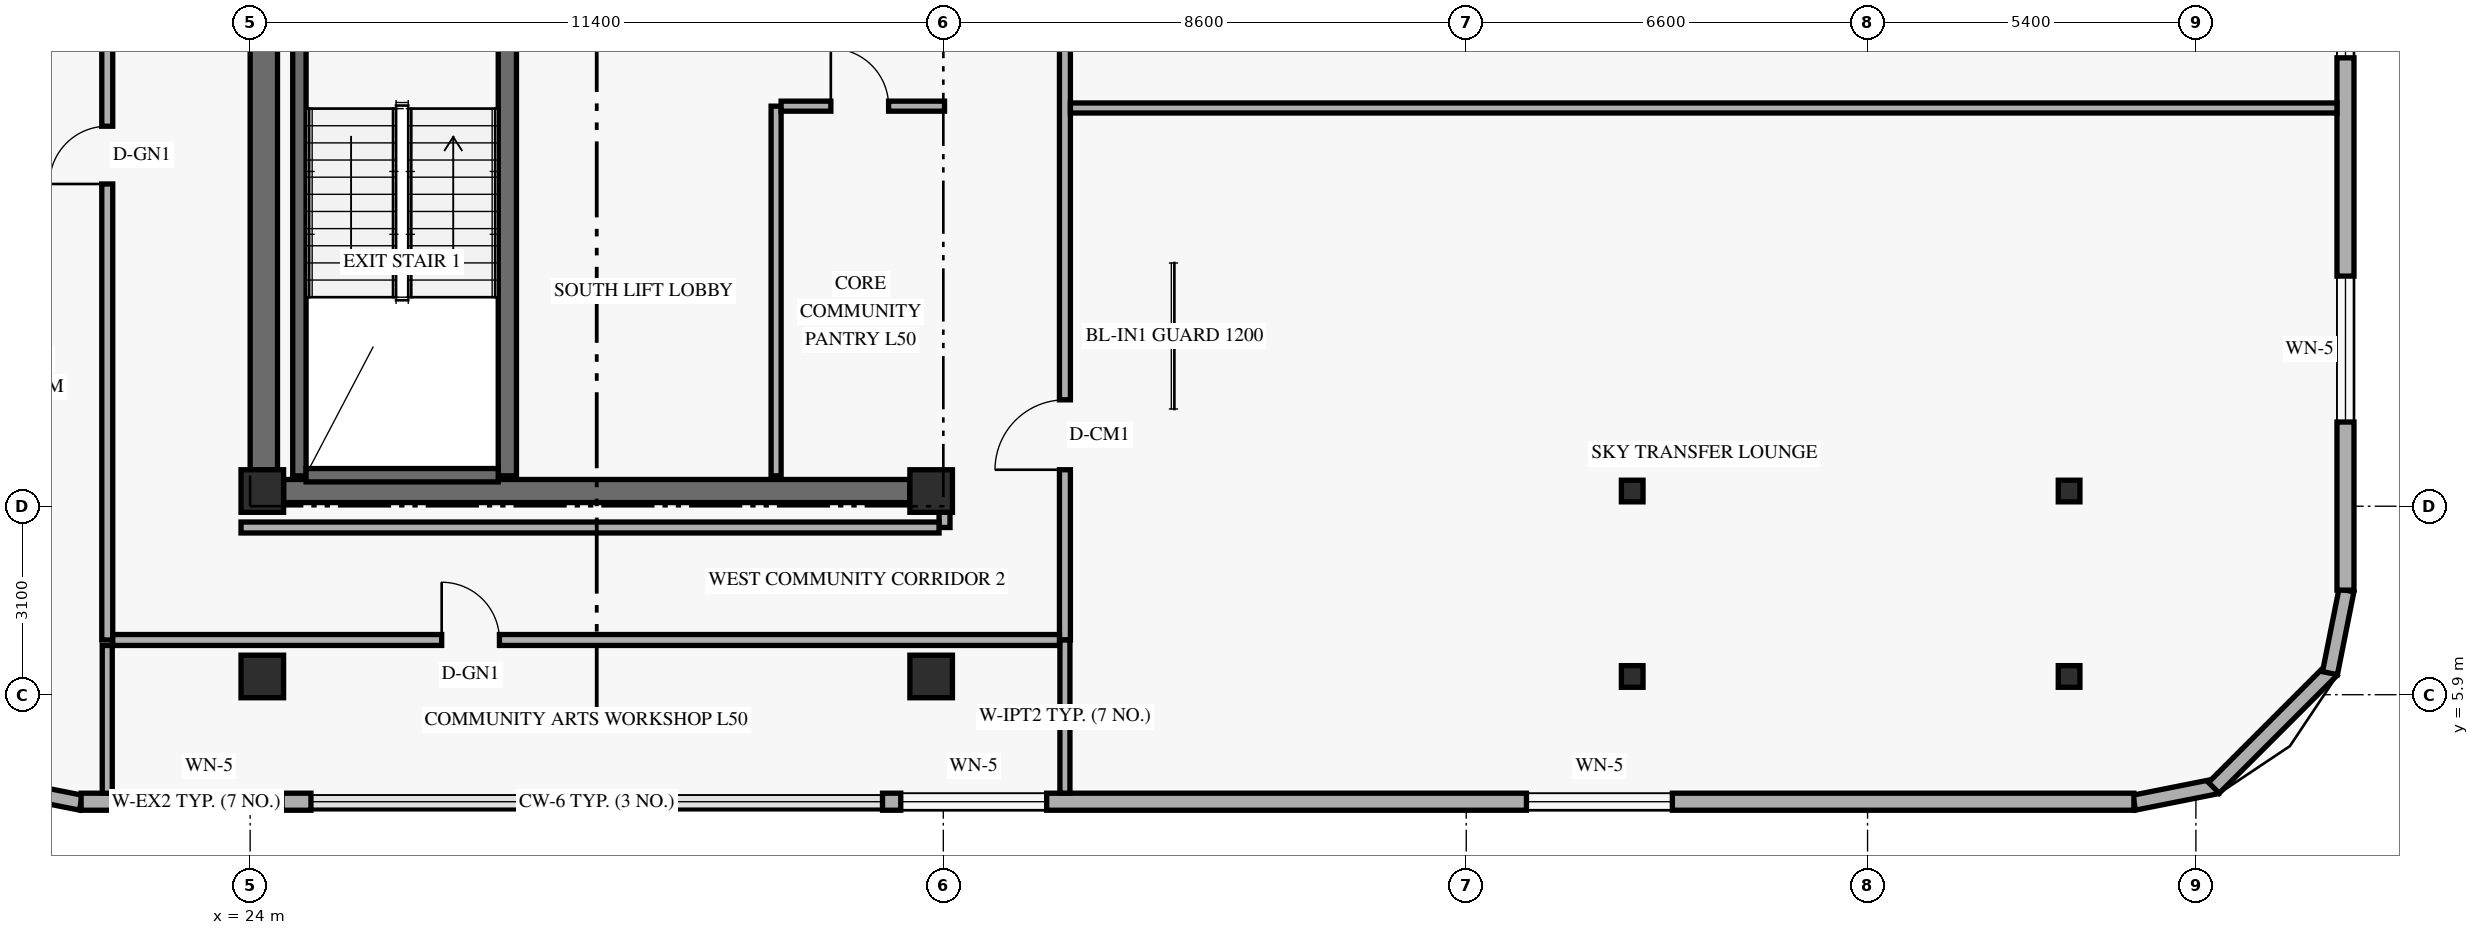
"""IFC4 building model, lengths in metres.
Left out: names, types, materials, properties, quantities, classifications, styles, units other than length and angle.
Written with IfcOpenShell. Run it as: python <this file> out.ifc"""

import sys

from ifc_helpers import new_model, si_unit, direction, frame, frame_2d, origin, origin_2d, place, context, subcontext, project, spatial, rectangle, hollow_rectangle, extrude, element, fill, save


model = new_model("IFC4")
c1 = context("Model", 3, precision=1e-05, world=origin(), true_north=direction((0.0, 1.0)))
c2 = subcontext(c1, "Body", "Model", "MODEL_VIEW")
j1 = project(units=[si_unit("LENGTHUNIT", "METRE"), si_unit("PLANEANGLEUNIT", "RADIAN")], contexts=[c1])
p1 = place(None, origin())
s1 = spatial("IfcSite", under=j1, at=p1, CompositionType="ELEMENT")
p2 = place(p1, origin())
s2 = spatial("IfcBuilding", under=s1, at=p2, CompositionType="ELEMENT")
p3 = place(p2, frame((0.0, 0.0, 192.0)))
s3 = spatial("IfcBuildingStorey", under=s2, at=p3, CompositionType="ELEMENT", Elevation=192.0)
p4 = place(p3, frame((24.225, 9.6, 0.0), z_axis=(0.0, 0.0, 1.0), x_axis=(0.0, 1.0, 0.0)))
e1 = element("IfcWall", 1, at=p4, inside=s3, PredefinedType="SHEAR", context=c2, shape_type="SweptSolid", body=[
    extrude(rectangle(XDim=7.6, YDim=0.45, at=frame_2d((3.8, 0.0))), origin(), (0.0, 0.0, 1.0), 3.348),
])
p5 = place(p3, frame((24.55, 9.25, 0.0), z_axis=(0.0, 0.0, 1.0), x_axis=(1.0, 0.0, 0.0)))
e2 = element("IfcWall", 2, at=p5, inside=s3, PredefinedType="SHEAR", context=c2, shape_type="SweptSolid", body=[
    extrude(rectangle(XDim=10.3, YDim=0.38, at=frame_2d((5.15, 0.0))), origin(), (0.0, 0.0, 1.0), 3.96),
])
p6 = place(p3, frame((24.81, 9.5, 0.0), z_axis=(0.0, 0.0, 1.0), x_axis=(0.0, 1.0, 0.0)))
e3 = element("IfcWall", 3, at=p6, inside=s3, PredefinedType="SHEAR", context=c2, shape_type="SweptSolid", body=[
    extrude(rectangle(XDim=7.76, YDim=0.22, at=frame_2d((3.88, 0.0))), origin(), (0.0, 0.0, 1.0), 3.96),
])
p7 = place(p3, frame((28.23, 9.5, 0.0), z_axis=(0.0, 0.0, 1.0), x_axis=(0.0, 1.0, 0.0)))
e4 = element("IfcWall", 4, at=p7, inside=s3, PredefinedType="SHEAR", context=c2, shape_type="SweptSolid", body=[
    extrude(rectangle(XDim=7.76, YDim=0.3, at=frame_2d((3.88, 0.0))), origin(), (0.0, 0.0, 1.0), 3.96),
])
p8 = place(p3, frame((24.92, 9.51, 0.0), z_axis=(0.0, 0.0, 1.0), x_axis=(1.0, 0.0, 0.0)))
e5 = element("IfcWall", 5, at=p8, inside=s3, PredefinedType="SHEAR", context=c2, shape_type="SweptSolid", body=[
    extrude(rectangle(XDim=3.16, YDim=0.22, at=frame_2d((1.58, 0.0))), origin(), (0.0, 0.0, 1.0), 3.96),
])
for number, where, z_axis, x_axis in (
    (6, (24.2, 6.2, 0.0), (0.0, 0.0, 1.0), (1.0, 0.0, 0.0)),
    (7, (24.2, 9.25, 0.0), (0.0, 0.0, 1.0), (1.0, 0.0, 0.0)),
    (8, (35.2, 6.2, 0.0), (0.0, 0.0, 1.0), (1.0, 0.0, 0.0)),
    (9, (35.2, 9.25, 0.0), (0.0, 0.0, 1.0), (1.0, 0.0, 0.0)),
):
    element("IfcColumn", number, at=place(p3, frame(where, z_axis=z_axis, x_axis=x_axis)), inside=s3, PredefinedType="COLUMN", context=c2, shape_type="SweptSolid", body=[
        extrude(rectangle(XDim=0.7, YDim=0.7, at=origin_2d()), origin(), (0.0, 0.0, 1.0), 4.2),
    ])
for number, where, z_axis, x_axis in (
    (10, (46.656, 6.2, 0.0), (0.035, 0.0, 0.999), (0.0, 1.0, 0.0)),
    (11, (46.656, 9.25, 0.0), (0.035, 0.0, 0.999), (0.0, 1.0, 0.0)),
):
    element("IfcColumn", number, at=place(p3, frame(where, z_axis=z_axis, x_axis=x_axis)), inside=s3, PredefinedType="COLUMN", context=c2, shape_type="SweptSolid", body=[
        extrude(hollow_rectangle(XDim=0.356, YDim=0.356, WallThickness=0.016, at=origin_2d()), origin(), (0.0, 0.0, 1.0), 4.203),
    ])
for number, where, z_axis, x_axis in (
    (12, (53.793, 6.2, 0.0), (0.058, 0.0, 0.998), (0.0, 1.0, 0.0)),
    (13, (53.793, 9.25, 0.0), (0.058, 0.0, 0.998), (0.0, 1.0, 0.0)),
):
    element("IfcColumn", number, at=place(p3, frame(where, z_axis=z_axis, x_axis=x_axis)), inside=s3, PredefinedType="COLUMN", context=c2, shape_type="SweptSolid", body=[
        extrude(hollow_rectangle(XDim=0.356, YDim=0.356, WallThickness=0.016, at=origin_2d()), origin(), (0.0, 0.0, 1.0), 4.207),
    ])
for number, where, z_axis, x_axis in (
    (14, (19.854, 4.395, 0.0), (0.0, 0.0, 1.0), (0.981, -0.195, 0.0)),
    (15, (54.983, 4.124, 0.0), (0.0, 0.0, 1.0), (0.981, 0.195, 0.0)),
):
    element("IfcWall", number, at=place(p3, frame(where, z_axis=z_axis, x_axis=x_axis)), inside=s3, PredefinedType="SOLIDWALL", context=c2, shape_type="SweptSolid", body=[
        extrude(rectangle(XDim=1.389, YDim=0.25, at=frame_2d((0.694, 0.0))), origin(), (0.0, 0.0, 1.0), 3.96),
    ])
p9 = place(p3, frame((56.295, 4.368, 0.0), z_axis=(0.0, 0.0, 1.0), x_axis=(0.707106781187, 0.707106781187, 0.0)))
e16 = element("IfcWall", 16, at=p9, inside=s3, PredefinedType="SOLIDWALL", context=c2, shape_type="SweptSolid", body=[
    extrude(rectangle(XDim=2.739, YDim=0.25, at=frame_2d((1.37, 0.0))), origin(), (0.0, 0.0, 1.0), 3.96),
])
p10 = place(p3, frame((58.205, 6.254, 0.0), z_axis=(0.0, 0.0, 1.0), x_axis=(0.19496651342, 0.980809899341, 0.0)))
e17 = element("IfcWall", 17, at=p10, inside=s3, PredefinedType="SOLIDWALL", context=c2, shape_type="SweptSolid", body=[
    extrude(rectangle(XDim=1.389, YDim=0.25, at=frame_2d((0.694, 0.0))), origin(), (0.0, 0.0, 1.0), 3.96),
])
p11 = place(p3, frame((21.22, 4.14, 0.0), z_axis=(0.0, 0.0, 1.0), x_axis=(1.0, 0.0, 0.0)))
e18 = element("IfcWall", 18, at=p11, inside=s3, PredefinedType="SOLIDWALL", context=c2, shape_type="SweptSolid", body=[
    extrude(rectangle(XDim=3.78, YDim=0.28, at=frame_2d((1.89, 0.0))), origin(), (0.0, 0.0, 1.0), 3.96),
])
p12 = place(p11, frame((0.905, 0.0, 0.85)))
e19 = element("IfcOpeningElement", 19, at=p12, cuts=e18, PredefinedType="OPENING", context=c2, shape_type="SweptSolid", body=[
    extrude(rectangle(XDim=2.4, YDim=1.9, at=frame_2d((1.2, 0.95))), frame((0.0, 0.15, 0.0), z_axis=(0.0, -1.0, 0.0), x_axis=(1.0, 0.0, 0.0)), (0.0, 0.0, 1.0), 0.3),
])
p13 = place(p3, frame((34.4, 4.14, 0.0), z_axis=(0.0, 0.0, 1.0), x_axis=(1.0, 0.0, 0.0)))
e20 = element("IfcWall", 20, at=p13, inside=s3, PredefinedType="SOLIDWALL", context=c2, shape_type="SweptSolid", body=[
    extrude(rectangle(XDim=20.58, YDim=0.28, at=frame_2d((10.29, 0.0))), origin(), (0.0, 0.0, 1.0), 3.96),
])
p14 = place(p13, frame((0.3, 0.0, 0.85)))
e21 = element("IfcOpeningElement", 21, at=p14, cuts=e20, PredefinedType="OPENING", context=c2, shape_type="SweptSolid", body=[
    extrude(rectangle(XDim=2.4, YDim=1.9, at=frame_2d((1.2, 0.95))), frame((0.0, 0.15, 0.0), z_axis=(0.0, -1.0, 0.0), x_axis=(1.0, 0.0, 0.0)), (0.0, 0.0, 1.0), 0.3),
])
p15 = place(p13, frame((10.59, 0.0, 0.85)))
e22 = element("IfcOpeningElement", 22, at=p15, cuts=e20, PredefinedType="OPENING", context=c2, shape_type="SweptSolid", body=[
    extrude(rectangle(XDim=2.4, YDim=1.9, at=frame_2d((1.2, 0.95))), frame((0.0, 0.15, 0.0), z_axis=(0.0, -1.0, 0.0), x_axis=(1.0, 0.0, 0.0)), (0.0, 0.0, 1.0), 0.3),
])
p16 = place(p3, frame((58.46, 7.62, 0.0), z_axis=(0.0, 0.0, 1.0), x_axis=(0.0, 1.0, 0.0)))
e23 = element("IfcWall", 23, at=p16, inside=s3, PredefinedType="SOLIDWALL", context=c2, shape_type="SweptSolid", body=[
    extrude(rectangle(XDim=10.78, YDim=0.28, at=frame_2d((5.39, 0.0))), origin(), (0.0, 0.0, 1.0), 3.96),
])
p17 = place(p16, frame((2.765, 0.0, 0.85)))
e24 = element("IfcOpeningElement", 24, at=p17, cuts=e23, PredefinedType="OPENING", context=c2, shape_type="SweptSolid", body=[
    extrude(rectangle(XDim=2.4, YDim=1.9, at=frame_2d((1.2, 0.95))), frame((0.0, 0.15, 0.0), z_axis=(0.0, -1.0, 0.0), x_axis=(1.0, 0.0, 0.0)), (0.0, 0.0, 1.0), 0.3),
])
p18 = place(p16, frame((8.755, 0.0, 0.85)))
e25 = element("IfcOpeningElement", 25, at=p18, cuts=e23, PredefinedType="OPENING", context=c2, shape_type="SweptSolid", body=[
    extrude(rectangle(XDim=1.2, YDim=1.5, at=frame_2d((0.6, 0.75))), frame((0.0, 0.15, 0.0), z_axis=(0.0, -1.0, 0.0), x_axis=(1.0, 0.0, 0.0)), (0.0, 0.0, 1.0), 0.3),
])
p19 = place(p3, frame((37.4, 6.8, 0.0), z_axis=(0.0, 0.0, 1.0), x_axis=(0.0, 1.0, 0.0)))
e26 = element("IfcWall", 26, at=p19, inside=s3, PredefinedType="STANDARD", context=c2, shape_type="SweptSolid", body=[
    extrude(rectangle(XDim=34.4, YDim=0.18, at=frame_2d((17.2, 0.0))), origin(), (0.0, 0.0, 1.0), 3.33),
])
p20 = place(p19, frame((25.71, 0.0, 0.0)))
e27 = element("IfcOpeningElement", 27, at=p20, cuts=e26, PredefinedType="OPENING", context=c2, shape_type="SweptSolid", body=[
    extrude(rectangle(XDim=0.92, YDim=2.14, at=frame_2d((0.46, 1.07))), frame((0.0, 0.1, 0.0), z_axis=(0.0, -1.0, 0.0), x_axis=(1.0, 0.0, 0.0)), (0.0, 0.0, 1.0), 0.2),
])
p21 = place(p19, frame((31.88, 0.0, 0.0)))
e28 = element("IfcOpeningElement", 28, at=p21, cuts=e26, PredefinedType="OPENING", context=c2, shape_type="SweptSolid", body=[
    extrude(rectangle(XDim=0.95, YDim=2.14, at=frame_2d((0.475, 1.07))), frame((0.0, 0.1, 0.0), z_axis=(0.0, -1.0, 0.0), x_axis=(1.0, 0.0, 0.0)), (0.0, 0.0, 1.0), 0.2),
])
p22 = place(p19, frame((2.8, 0.0, 0.0)))
e29 = element("IfcOpeningElement", 29, at=p22, cuts=e26, PredefinedType="OPENING", context=c2, shape_type="SweptSolid", body=[
    extrude(rectangle(XDim=1.15, YDim=2.15, at=frame_2d((0.575, 1.075))), frame((0.0, 0.1, 0.0), z_axis=(0.0, -1.0, 0.0), x_axis=(1.0, 0.0, 0.0)), (0.0, 0.0, 1.0), 0.2),
])
p23 = place(p19, frame((21.6, 0.0, 0.0)))
e30 = element("IfcOpeningElement", 30, at=p23, cuts=e26, PredefinedType="OPENING", context=c2, shape_type="SweptSolid", body=[
    extrude(rectangle(XDim=1.15, YDim=2.15, at=frame_2d((0.575, 1.075))), frame((0.0, 0.1, 0.0), z_axis=(0.0, -1.0, 0.0), x_axis=(1.0, 0.0, 0.0)), (0.0, 0.0, 1.0), 0.2),
])
p24 = place(p3, frame((37.4, 4.28, 0.0), z_axis=(0.0, 0.0, 1.0), x_axis=(0.0, 1.0, 0.0)))
e31 = element("IfcWall", 31, at=p24, inside=s3, PredefinedType="PARTITIONING", context=c2, shape_type="SweptSolid", body=[
    extrude(rectangle(XDim=2.52, YDim=0.165, at=frame_2d((1.26, 0.0))), origin(), (0.0, 0.0, 1.0), 3.479),
])
p25 = place(p3, frame((35.42, 8.65, 0.0), z_axis=(0.0, 0.0, 1.0), x_axis=(0.0, 1.0, 0.0)))
e32 = element("IfcWall", 32, at=p25, inside=s3, PredefinedType="STANDARD", context=c2, shape_type="SweptSolid", body=[
    extrude(rectangle(XDim=0.6, YDim=0.18, at=frame_2d((0.3, 0.0))), origin(), (0.0, 0.0, 1.0), 3.33),
])
p26 = place(p3, frame((37.49, 15.55, 0.0), z_axis=(0.0, 0.0, 1.0), x_axis=(1.0, 0.0, 0.0)))
e33 = element("IfcWall", 33, at=p26, inside=s3, PredefinedType="PARTITIONING", context=c2, shape_type="SweptSolid", body=[
    extrude(rectangle(XDim=20.83, YDim=0.165, at=frame_2d((10.415, 0.0))), origin(), (0.0, 0.0, 1.0), 3.33),
])
p27 = place(p3, frame((32.65, 9.5, 0.0), z_axis=(0.0, 0.0, 1.0), x_axis=(0.0, 1.0, 0.0)))
e34 = element("IfcWall", 34, at=p27, inside=s3, PredefinedType="PARTITIONING", context=c2, shape_type="SweptSolid", body=[
    extrude(rectangle(XDim=6.08, YDim=0.165, at=frame_2d((3.04, 0.0))), origin(), (0.0, 0.0, 1.0), 3.96),
])
p28 = place(p3, frame((32.732, 15.58, 0.0), z_axis=(0.0, 0.0, 1.0), x_axis=(1.0, 0.0, 0.0)))
e35 = element("IfcWall", 35, at=p28, inside=s3, PredefinedType="PARTITIONING", context=c2, shape_type="SweptSolid", body=[
    extrude(rectangle(XDim=2.688, YDim=0.165, at=frame_2d((1.344, 0.0))), origin(), (0.0, 0.0, 1.0), 3.33),
])
p29 = place(p28, frame((0.817, 0.0, 0.0)))
e36 = element("IfcOpeningElement", 36, at=p29, cuts=e35, PredefinedType="OPENING", context=c2, shape_type="SweptSolid", body=[
    extrude(rectangle(XDim=0.95, YDim=2.15, at=frame_2d((0.475, 1.075))), frame((0.0, 0.093, 0.0), z_axis=(0.0, -1.0, 0.0), x_axis=(1.0, 0.0, 0.0)), (0.0, 0.0, 1.0), 0.185),
])
p30 = place(p3, frame((21.65, 6.8, 0.0), z_axis=(0.0, 0.0, 1.0), x_axis=(0.0, 1.0, 0.0)))
e37 = element("IfcWall", 37, at=p30, inside=s3, PredefinedType="STANDARD", context=c2, shape_type="SweptSolid", body=[
    extrude(rectangle(XDim=34.4, YDim=0.18, at=frame_2d((17.2, 0.0))), origin(), (0.0, 0.0, 1.0), 3.33),
])
p31 = place(p30, frame((7.5, 0.0, 0.0)))
e38 = element("IfcOpeningElement", 38, at=p31, cuts=e37, PredefinedType="OPENING", context=c2, shape_type="SweptSolid", body=[
    extrude(rectangle(XDim=0.95, YDim=2.15, at=frame_2d((0.475, 1.075))), frame((0.0, 0.1, 0.0), z_axis=(0.0, -1.0, 0.0), x_axis=(1.0, 0.0, 0.0)), (0.0, 0.0, 1.0), 0.2),
])
p32 = place(p30, frame((22.5, 0.0, 0.0)))
e39 = element("IfcOpeningElement", 39, at=p32, cuts=e37, PredefinedType="OPENING", context=c2, shape_type="SweptSolid", body=[
    extrude(rectangle(XDim=0.95, YDim=2.15, at=frame_2d((0.475, 1.075))), frame((0.0, 0.1, 0.0), z_axis=(0.0, -1.0, 0.0), x_axis=(1.0, 0.0, 0.0)), (0.0, 0.0, 1.0), 0.2),
])
p33 = place(p3, frame((21.74, 6.8, 0.0), z_axis=(0.0, 0.0, 1.0), x_axis=(1.0, 0.0, 0.0)))
e40 = element("IfcWall", 40, at=p33, inside=s3, PredefinedType="STANDARD", context=c2, shape_type="SweptSolid", body=[
    extrude(rectangle(XDim=15.57, YDim=0.18, at=frame_2d((7.785, 0.0))), origin(), (0.0, 0.0, 1.0), 3.33),
])
p34 = place(p33, frame((5.41, 0.0, 0.0)))
e41 = element("IfcOpeningElement", 41, at=p34, cuts=e40, PredefinedType="OPENING", context=c2, shape_type="SweptSolid", body=[
    extrude(rectangle(XDim=0.95, YDim=2.15, at=frame_2d((0.475, 1.075))), frame((0.0, 0.1, 0.0), z_axis=(0.0, -1.0, 0.0), x_axis=(1.0, 0.0, 0.0)), (0.0, 0.0, 1.0), 0.2),
])
p35 = place(p3, frame((23.85, 8.65, 0.0), z_axis=(0.0, 0.0, 1.0), x_axis=(1.0, 0.0, 0.0)))
e42 = element("IfcWall", 42, at=p35, inside=s3, PredefinedType="STANDARD", context=c2, shape_type="SweptSolid", body=[
    extrude(rectangle(XDim=11.48, YDim=0.18, at=frame_2d((5.74, 0.0))), origin(), (0.0, 0.0, 1.0), 3.33),
])
p36 = place(p3, frame((21.65, 4.28, 0.0), z_axis=(0.0, 0.0, 1.0), x_axis=(0.0, 1.0, 0.0)))
e43 = element("IfcWall", 43, at=p36, inside=s3, PredefinedType="PARTITIONING", context=c2, shape_type="SweptSolid", body=[
    extrude(rectangle(XDim=2.43, YDim=0.165, at=frame_2d((1.215, 0.0))), origin(), (0.0, 0.0, 1.0), 3.479),
])
p37 = place(p12, origin())
e44 = element("IfcWindow", 44, at=p37, inside=s3, PartitioningType="SINGLE_PANEL", PredefinedType="WINDOW", context=c2, shape_type="SweptSolid", body=[
    extrude(rectangle(XDim=2.4, YDim=1.9, at=frame_2d((1.2, 0.95))), frame((0.0, 0.03, 0.0), z_axis=(0.0, -1.0, 0.0), x_axis=(1.0, 0.0, 0.0)), (0.0, 0.0, 1.0), 0.06),
])
fill(e19, e44)
p38 = place(p14, origin())
e45 = element("IfcWindow", 45, at=p38, inside=s3, PartitioningType="SINGLE_PANEL", PredefinedType="WINDOW", context=c2, shape_type="SweptSolid", body=[
    extrude(rectangle(XDim=2.4, YDim=1.9, at=frame_2d((1.2, 0.95))), frame((0.0, 0.03, 0.0), z_axis=(0.0, -1.0, 0.0), x_axis=(1.0, 0.0, 0.0)), (0.0, 0.0, 1.0), 0.06),
])
fill(e21, e45)
p39 = place(p15, origin())
e46 = element("IfcWindow", 46, at=p39, inside=s3, PartitioningType="SINGLE_PANEL", PredefinedType="WINDOW", context=c2, shape_type="SweptSolid", body=[
    extrude(rectangle(XDim=2.4, YDim=1.9, at=frame_2d((1.2, 0.95))), frame((0.0, 0.03, 0.0), z_axis=(0.0, -1.0, 0.0), x_axis=(1.0, 0.0, 0.0)), (0.0, 0.0, 1.0), 0.06),
])
fill(e22, e46)
p40 = place(p17, origin())
e47 = element("IfcWindow", 47, at=p40, inside=s3, PartitioningType="SINGLE_PANEL", PredefinedType="WINDOW", context=c2, shape_type="SweptSolid", body=[
    extrude(rectangle(XDim=2.4, YDim=1.9, at=frame_2d((1.2, 0.95))), frame((0.0, 0.03, 0.0), z_axis=(0.0, -1.0, 0.0), x_axis=(1.0, 0.0, 0.0)), (0.0, 0.0, 1.0), 0.06),
])
fill(e24, e47)
p41 = place(p18, origin())
e48 = element("IfcWindow", 48, at=p41, inside=s3, PartitioningType="SINGLE_PANEL", PredefinedType="WINDOW", context=c2, shape_type="SweptSolid", body=[
    extrude(rectangle(XDim=1.2, YDim=1.5, at=frame_2d((0.6, 0.75))), frame((0.0, 0.03, 0.0), z_axis=(0.0, -1.0, 0.0), x_axis=(1.0, 0.0, 0.0)), (0.0, 0.0, 1.0), 0.06),
])
fill(e25, e48)
p42 = place(p29, origin())
e49 = element("IfcDoor", 49, at=p42, inside=s3, OperationType="SINGLE_SWING_LEFT", PredefinedType="DOOR", context=c2, shape_type="SweptSolid", body=[
    extrude(rectangle(XDim=0.95, YDim=2.15, at=frame_2d((0.475, 1.075))), frame((0.0, 0.025, 0.0), z_axis=(0.0, -1.0, 0.0), x_axis=(1.0, 0.0, 0.0)), (0.0, 0.0, 1.0), 0.05),
])
fill(e36, e49)
p43 = place(p22, origin())
e50 = element("IfcDoor", 50, at=p43, inside=s3, OperationType="SINGLE_SWING_LEFT", PredefinedType="DOOR", context=c2, shape_type="SweptSolid", body=[
    extrude(rectangle(XDim=1.15, YDim=2.15, at=frame_2d((0.575, 1.075))), frame((0.0, 0.025, 0.0), z_axis=(0.0, -1.0, 0.0), x_axis=(1.0, 0.0, 0.0)), (0.0, 0.0, 1.0), 0.05),
])
fill(e29, e50)
p44 = place(p31, origin())
e51 = element("IfcDoor", 51, at=p44, inside=s3, OperationType="SINGLE_SWING_LEFT", PredefinedType="DOOR", context=c2, shape_type="SweptSolid", body=[
    extrude(rectangle(XDim=0.95, YDim=2.15, at=frame_2d((0.475, 1.075))), frame((0.0, 0.025, 0.0), z_axis=(0.0, -1.0, 0.0), x_axis=(1.0, 0.0, 0.0)), (0.0, 0.0, 1.0), 0.05),
])
fill(e38, e51)
p45 = place(p34, origin())
e52 = element("IfcDoor", 52, at=p45, inside=s3, OperationType="SINGLE_SWING_LEFT", PredefinedType="DOOR", context=c2, shape_type="SweptSolid", body=[
    extrude(rectangle(XDim=0.95, YDim=2.15, at=frame_2d((0.475, 1.075))), frame((0.0, 0.025, 0.0), z_axis=(0.0, -1.0, 0.0), x_axis=(1.0, 0.0, 0.0)), (0.0, 0.0, 1.0), 0.05),
])
fill(e41, e52)
save(model, sys.argv[1])
